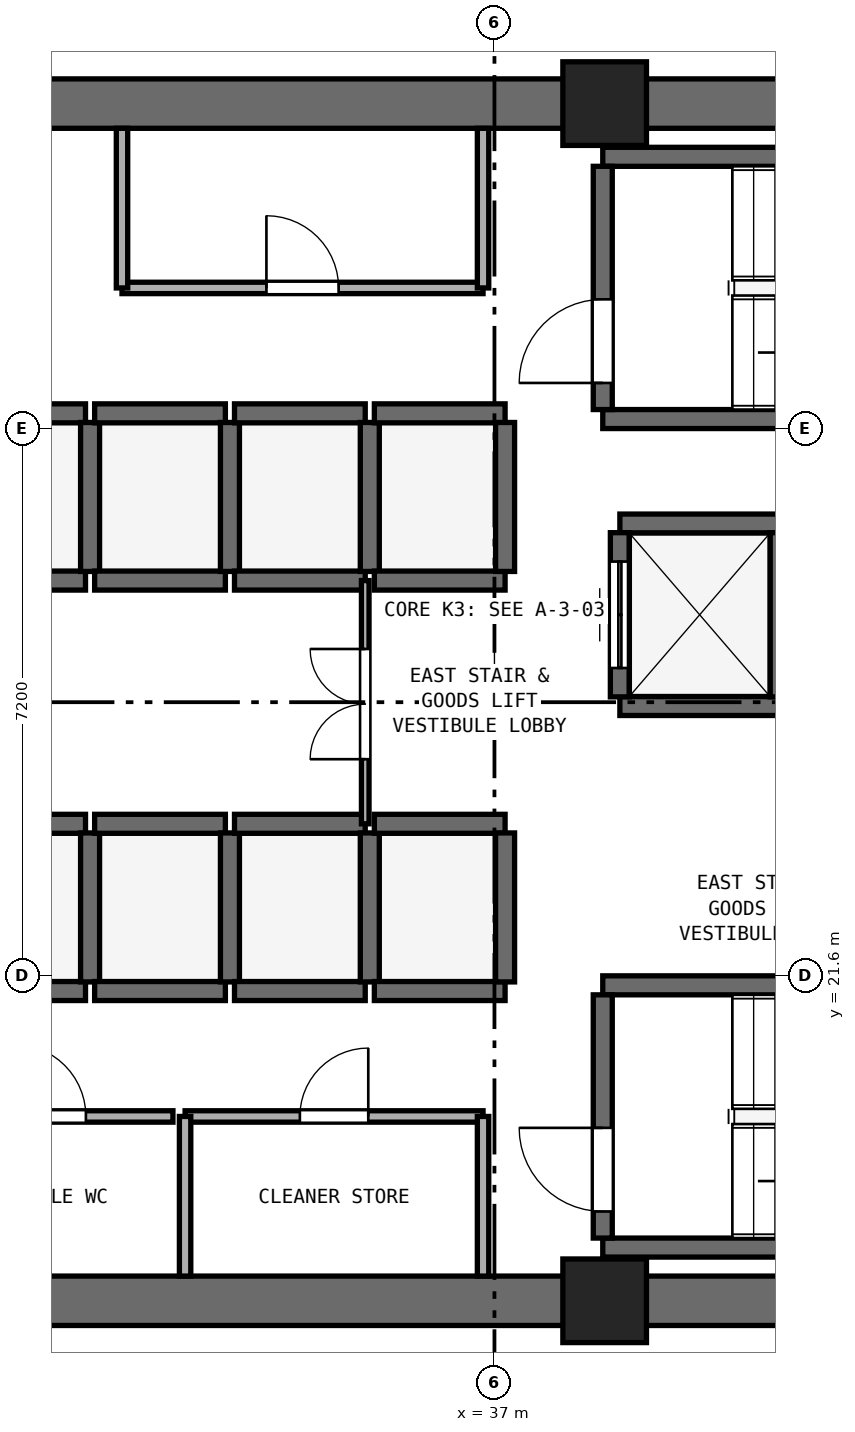
"""IFC4 building model, lengths in metres.
Left out: names, types, materials, properties, quantities, classifications, styles, units other than length and angle.
Written with IfcOpenShell. Run it as: python <this file> out.ifc"""

import sys

from ifc_helpers import new_model, si_unit, direction, frame, frame_2d, origin, origin_2d, place, context, subcontext, project, spatial, rectangle, extrude, element, fill, save


model = new_model("IFC4")
c1 = context("Model", 3, precision=1e-05, world=origin(), true_north=direction((0.0, 1.0)))
c2 = subcontext(c1, "Body", "Model", "MODEL_VIEW")
j1 = project(units=[si_unit("LENGTHUNIT", "METRE"), si_unit("PLANEANGLEUNIT", "RADIAN")], contexts=[c1])
p1 = place(None, origin())
s1 = spatial("IfcSite", under=j1, at=p1, CompositionType="ELEMENT")
p2 = place(p1, origin())
s2 = spatial("IfcBuilding", under=s1, at=p2, CompositionType="ELEMENT")
p3 = place(p2, frame((0.0, 0.0, 116.2)))
s3 = spatial("IfcBuildingStorey", under=s2, at=p3, CompositionType="ELEMENT", Elevation=116.2)
for number, where, z_axis, x_axis in (
    (1, (25.4, 17.325, 0.0), (0.0, 0.0, 1.0), (1.0, 0.0, 0.0)),
    (2, (25.4, 33.075, 0.0), (0.0, 0.0, 1.0), (1.0, 0.0, 0.0)),
):
    element("IfcWall", number, at=place(p3, frame(where, z_axis=z_axis, x_axis=x_axis)), inside=s3, PredefinedType="SHEAR", context=c2, shape_type="SweptSolid", body=[
        extrude(rectangle(XDim=23.2, YDim=0.65, at=frame_2d((11.6, 0.0))), origin(), (0.0, 0.0, 1.0), 3.4),
    ])
for number, where, z_axis, x_axis in (
    (3, (38.45, 17.325, 0.0), (0.0, 0.0, 1.0), (1.0, 0.0, 0.0)),
    (4, (38.45, 33.075, 0.0), (0.0, 0.0, 1.0), (1.0, 0.0, 0.0)),
):
    element("IfcColumn", number, at=place(p3, frame(where, z_axis=z_axis, x_axis=x_axis)), inside=s3, PredefinedType="PILASTER", context=c2, shape_type="SweptSolid", body=[
        extrude(rectangle(XDim=1.1, YDim=1.1, at=origin_2d()), origin(), (0.0, 0.0, 1.0), 3.8),
    ])
for number, where, z_axis, x_axis in (
    (5, (38.425, 28.925, 0.0), (0.0, 0.0, 1.0), (1.0, 0.0, 0.0)),
    (6, (38.425, 32.375, 0.0), (0.0, 0.0, 1.0), (1.0, 0.0, 0.0)),
):
    element("IfcWall", number, at=place(p3, frame(where, z_axis=z_axis, x_axis=x_axis)), inside=s3, PredefinedType="SHEAR", context=c2, shape_type="SweptSolid", body=[
        extrude(rectangle(XDim=7.3, YDim=0.25, at=frame_2d((3.65, 0.0))), origin(), (0.0, 0.0, 1.0), 3.4),
    ])
p4 = place(p3, frame((38.425, 29.05, 0.0), z_axis=(0.0, 0.0, 1.0), x_axis=(0.0, 1.0, 0.0)))
e7 = element("IfcWall", 7, at=p4, inside=s3, PredefinedType="SHEAR", context=c2, shape_type="SweptSolid", body=[
    extrude(rectangle(XDim=3.2, YDim=0.25, at=frame_2d((1.6, 0.0))), origin(), (0.0, 0.0, 1.0), 3.4),
])
p5 = place(p4, frame((0.35, 0.0, 0.0)))
e8 = element("IfcOpeningElement", 8, at=p5, cuts=e7, PredefinedType="OPENING", context=c2, shape_type="SweptSolid", body=[
    extrude(rectangle(XDim=1.1, YDim=2.15, at=frame_2d((0.55, 1.075))), frame((0.0, 0.135, 0.0), z_axis=(0.0, -1.0, 0.0), x_axis=(1.0, 0.0, 0.0)), (0.0, 0.0, 1.0), 0.27),
])
for number, where, z_axis, x_axis in (
    (9, (38.425, 18.025, 0.0), (0.0, 0.0, 1.0), (1.0, 0.0, 0.0)),
    (10, (38.425, 21.475, 0.0), (0.0, 0.0, 1.0), (1.0, 0.0, 0.0)),
):
    element("IfcWall", number, at=place(p3, frame(where, z_axis=z_axis, x_axis=x_axis)), inside=s3, PredefinedType="SHEAR", context=c2, shape_type="SweptSolid", body=[
        extrude(rectangle(XDim=7.3, YDim=0.25, at=frame_2d((3.65, 0.0))), origin(), (0.0, 0.0, 1.0), 3.4),
    ])
p6 = place(p3, frame((38.425, 18.15, 0.0), z_axis=(0.0, 0.0, 1.0), x_axis=(0.0, 1.0, 0.0)))
e11 = element("IfcWall", 11, at=p6, inside=s3, PredefinedType="SHEAR", context=c2, shape_type="SweptSolid", body=[
    extrude(rectangle(XDim=3.2, YDim=0.25, at=frame_2d((1.6, 0.0))), origin(), (0.0, 0.0, 1.0), 3.4),
])
p7 = place(p6, frame((0.35, 0.0, 0.0)))
e12 = element("IfcOpeningElement", 12, at=p7, cuts=e11, PredefinedType="OPENING", context=c2, shape_type="SweptSolid", body=[
    extrude(rectangle(XDim=1.1, YDim=2.15, at=frame_2d((0.55, 1.075))), frame((0.0, 0.135, 0.0), z_axis=(0.0, -1.0, 0.0), x_axis=(1.0, 0.0, 0.0)), (0.0, 0.0, 1.0), 0.27),
])
for number, where, z_axis, x_axis in (
    (13, (29.9, 21.4, 0.0), (0.0, 0.0, 1.0), (1.0, 0.0, 0.0)),
    (14, (29.9, 23.6, 0.0), (0.0, 0.0, 1.0), (1.0, 0.0, 0.0)),
):
    element("IfcWall", number, at=place(p3, frame(where, z_axis=z_axis, x_axis=x_axis)), inside=s3, PredefinedType="SHEAR", context=c2, shape_type="SweptSolid", body=[
        extrude(rectangle(XDim=1.72, YDim=0.25, at=frame_2d((0.86, 0.0))), origin(), (0.0, 0.0, 1.0), 3.4),
    ])
p8 = place(p3, frame((31.68, 21.52, 0.0), z_axis=(0.0, 0.0, 1.0), x_axis=(0.0, 1.0, 0.0)))
e15 = element("IfcWall", 15, at=p8, inside=s3, PredefinedType="SHEAR", context=c2, shape_type="SweptSolid", body=[
    extrude(rectangle(XDim=1.96, YDim=0.25, at=frame_2d((0.98, 0.0))), origin(), (0.0, 0.0, 1.0), 3.4),
])
for number, where, z_axis, x_axis in (
    (16, (31.74, 21.4, 0.0), (0.0, 0.0, 1.0), (1.0, 0.0, 0.0)),
    (17, (31.74, 23.6, 0.0), (0.0, 0.0, 1.0), (1.0, 0.0, 0.0)),
):
    element("IfcWall", number, at=place(p3, frame(where, z_axis=z_axis, x_axis=x_axis)), inside=s3, PredefinedType="SHEAR", context=c2, shape_type="SweptSolid", body=[
        extrude(rectangle(XDim=1.72, YDim=0.25, at=frame_2d((0.86, 0.0))), origin(), (0.0, 0.0, 1.0), 3.4),
    ])
p9 = place(p3, frame((33.52, 21.52, 0.0), z_axis=(0.0, 0.0, 1.0), x_axis=(0.0, 1.0, 0.0)))
e18 = element("IfcWall", 18, at=p9, inside=s3, PredefinedType="SHEAR", context=c2, shape_type="SweptSolid", body=[
    extrude(rectangle(XDim=1.96, YDim=0.25, at=frame_2d((0.98, 0.0))), origin(), (0.0, 0.0, 1.0), 3.4),
])
for number, where, z_axis, x_axis in (
    (19, (33.58, 21.4, 0.0), (0.0, 0.0, 1.0), (1.0, 0.0, 0.0)),
    (20, (33.58, 23.6, 0.0), (0.0, 0.0, 1.0), (1.0, 0.0, 0.0)),
):
    element("IfcWall", number, at=place(p3, frame(where, z_axis=z_axis, x_axis=x_axis)), inside=s3, PredefinedType="SHEAR", context=c2, shape_type="SweptSolid", body=[
        extrude(rectangle(XDim=1.72, YDim=0.25, at=frame_2d((0.86, 0.0))), origin(), (0.0, 0.0, 1.0), 3.4),
    ])
p10 = place(p3, frame((35.36, 21.52, 0.0), z_axis=(0.0, 0.0, 1.0), x_axis=(0.0, 1.0, 0.0)))
e21 = element("IfcWall", 21, at=p10, inside=s3, PredefinedType="SHEAR", context=c2, shape_type="SweptSolid", body=[
    extrude(rectangle(XDim=1.96, YDim=0.25, at=frame_2d((0.98, 0.0))), origin(), (0.0, 0.0, 1.0), 3.4),
])
for number, where, z_axis, x_axis in (
    (22, (35.42, 21.4, 0.0), (0.0, 0.0, 1.0), (1.0, 0.0, 0.0)),
    (23, (35.42, 23.6, 0.0), (0.0, 0.0, 1.0), (1.0, 0.0, 0.0)),
):
    element("IfcWall", number, at=place(p3, frame(where, z_axis=z_axis, x_axis=x_axis)), inside=s3, PredefinedType="SHEAR", context=c2, shape_type="SweptSolid", body=[
        extrude(rectangle(XDim=1.72, YDim=0.25, at=frame_2d((0.86, 0.0))), origin(), (0.0, 0.0, 1.0), 3.4),
    ])
p11 = place(p3, frame((37.14, 21.52, 0.0), z_axis=(0.0, 0.0, 1.0), x_axis=(0.0, 1.0, 0.0)))
e24 = element("IfcWall", 24, at=p11, inside=s3, PredefinedType="SHEAR", context=c2, shape_type="SweptSolid", body=[
    extrude(rectangle(XDim=1.96, YDim=0.25, at=frame_2d((0.98, 0.0))), origin(), (0.0, 0.0, 1.0), 3.4),
])
for number, where, z_axis, x_axis in (
    (25, (29.9, 26.8, 0.0), (0.0, 0.0, 1.0), (1.0, 0.0, 0.0)),
    (26, (29.9, 29.0, 0.0), (0.0, 0.0, 1.0), (1.0, 0.0, 0.0)),
):
    element("IfcWall", number, at=place(p3, frame(where, z_axis=z_axis, x_axis=x_axis)), inside=s3, PredefinedType="SHEAR", context=c2, shape_type="SweptSolid", body=[
        extrude(rectangle(XDim=1.72, YDim=0.25, at=frame_2d((0.86, 0.0))), origin(), (0.0, 0.0, 1.0), 3.4),
    ])
p12 = place(p3, frame((31.68, 26.92, 0.0), z_axis=(0.0, 0.0, 1.0), x_axis=(0.0, 1.0, 0.0)))
e27 = element("IfcWall", 27, at=p12, inside=s3, PredefinedType="SHEAR", context=c2, shape_type="SweptSolid", body=[
    extrude(rectangle(XDim=1.96, YDim=0.25, at=frame_2d((0.98, 0.0))), origin(), (0.0, 0.0, 1.0), 3.4),
])
for number, where, z_axis, x_axis in (
    (28, (31.74, 26.8, 0.0), (0.0, 0.0, 1.0), (1.0, 0.0, 0.0)),
    (29, (31.74, 29.0, 0.0), (0.0, 0.0, 1.0), (1.0, 0.0, 0.0)),
):
    element("IfcWall", number, at=place(p3, frame(where, z_axis=z_axis, x_axis=x_axis)), inside=s3, PredefinedType="SHEAR", context=c2, shape_type="SweptSolid", body=[
        extrude(rectangle(XDim=1.72, YDim=0.25, at=frame_2d((0.86, 0.0))), origin(), (0.0, 0.0, 1.0), 3.4),
    ])
p13 = place(p3, frame((33.52, 26.92, 0.0), z_axis=(0.0, 0.0, 1.0), x_axis=(0.0, 1.0, 0.0)))
e30 = element("IfcWall", 30, at=p13, inside=s3, PredefinedType="SHEAR", context=c2, shape_type="SweptSolid", body=[
    extrude(rectangle(XDim=1.96, YDim=0.25, at=frame_2d((0.98, 0.0))), origin(), (0.0, 0.0, 1.0), 3.4),
])
for number, where, z_axis, x_axis in (
    (31, (33.58, 26.8, 0.0), (0.0, 0.0, 1.0), (1.0, 0.0, 0.0)),
    (32, (33.58, 29.0, 0.0), (0.0, 0.0, 1.0), (1.0, 0.0, 0.0)),
):
    element("IfcWall", number, at=place(p3, frame(where, z_axis=z_axis, x_axis=x_axis)), inside=s3, PredefinedType="SHEAR", context=c2, shape_type="SweptSolid", body=[
        extrude(rectangle(XDim=1.72, YDim=0.25, at=frame_2d((0.86, 0.0))), origin(), (0.0, 0.0, 1.0), 3.4),
    ])
p14 = place(p3, frame((35.36, 26.92, 0.0), z_axis=(0.0, 0.0, 1.0), x_axis=(0.0, 1.0, 0.0)))
e33 = element("IfcWall", 33, at=p14, inside=s3, PredefinedType="SHEAR", context=c2, shape_type="SweptSolid", body=[
    extrude(rectangle(XDim=1.96, YDim=0.25, at=frame_2d((0.98, 0.0))), origin(), (0.0, 0.0, 1.0), 3.4),
])
for number, where, z_axis, x_axis in (
    (34, (35.42, 26.8, 0.0), (0.0, 0.0, 1.0), (1.0, 0.0, 0.0)),
    (35, (35.42, 29.0, 0.0), (0.0, 0.0, 1.0), (1.0, 0.0, 0.0)),
):
    element("IfcWall", number, at=place(p3, frame(where, z_axis=z_axis, x_axis=x_axis)), inside=s3, PredefinedType="SHEAR", context=c2, shape_type="SweptSolid", body=[
        extrude(rectangle(XDim=1.72, YDim=0.25, at=frame_2d((0.86, 0.0))), origin(), (0.0, 0.0, 1.0), 3.4),
    ])
p15 = place(p3, frame((37.14, 26.92, 0.0), z_axis=(0.0, 0.0, 1.0), x_axis=(0.0, 1.0, 0.0)))
e36 = element("IfcWall", 36, at=p15, inside=s3, PredefinedType="SHEAR", context=c2, shape_type="SweptSolid", body=[
    extrude(rectangle(XDim=1.96, YDim=0.25, at=frame_2d((0.98, 0.0))), origin(), (0.0, 0.0, 1.0), 3.4),
])
for number, where, z_axis, x_axis in (
    (37, (38.65, 25.15, 0.0), (0.0, 0.0, 1.0), (1.0, 0.0, 0.0)),
    (38, (38.65, 27.55, 0.0), (0.0, 0.0, 1.0), (1.0, 0.0, 0.0)),
):
    element("IfcWall", number, at=place(p3, frame(where, z_axis=z_axis, x_axis=x_axis)), inside=s3, PredefinedType="SHEAR", context=c2, shape_type="SweptSolid", body=[
        extrude(rectangle(XDim=2.1, YDim=0.25, at=frame_2d((1.05, 0.0))), origin(), (0.0, 0.0, 1.0), 3.4),
    ])
p16 = place(p3, frame((38.65, 25.27, 0.0), z_axis=(0.0, 0.0, 1.0), x_axis=(0.0, 1.0, 0.0)))
e39 = element("IfcWall", 39, at=p16, inside=s3, PredefinedType="SHEAR", context=c2, shape_type="SweptSolid", body=[
    extrude(rectangle(XDim=2.16, YDim=0.25, at=frame_2d((1.08, 0.0))), origin(), (0.0, 0.0, 1.0), 3.4),
])
p17 = place(p16, frame((0.38, 0.0, 0.0)))
e40 = element("IfcOpeningElement", 40, at=p17, cuts=e39, PredefinedType="OPENING", context=c2, shape_type="SweptSolid", body=[
    extrude(rectangle(XDim=1.4, YDim=2.2, at=frame_2d((0.7, 1.1))), frame((0.0, 0.135, 0.0), z_axis=(0.0, -1.0, 0.0), x_axis=(1.0, 0.0, 0.0)), (0.0, 0.0, 1.0), 0.27),
])
p18 = place(p3, frame((40.75, 25.27, 0.0), z_axis=(0.0, 0.0, 1.0), x_axis=(0.0, 1.0, 0.0)))
e41 = element("IfcWall", 41, at=p18, inside=s3, PredefinedType="SHEAR", context=c2, shape_type="SweptSolid", body=[
    extrude(rectangle(XDim=2.16, YDim=0.25, at=frame_2d((1.08, 0.0))), origin(), (0.0, 0.0, 1.0), 3.4),
])
p19 = place(p3, frame((32.1, 30.65, 0.0), z_axis=(0.0, 0.0, 1.0), x_axis=(1.0, 0.0, 0.0)))
e42 = element("IfcWall", 42, at=p19, inside=s3, PredefinedType="PARTITIONING", context=c2, shape_type="SweptSolid", body=[
    extrude(rectangle(XDim=4.75, YDim=0.15, at=frame_2d((2.375, 0.0))), origin(), (0.0, 0.0, 1.0), 3.4),
])
p20 = place(p19, frame((1.9, 0.0, 0.0)))
e43 = element("IfcOpeningElement", 43, at=p20, cuts=e42, PredefinedType="OPENING", context=c2, shape_type="SweptSolid", body=[
    extrude(rectangle(XDim=0.95, YDim=2.1, at=frame_2d((0.475, 1.05))), frame((0.0, 0.085, 0.0), z_axis=(0.0, -1.0, 0.0), x_axis=(1.0, 0.0, 0.0)), (0.0, 0.0, 1.0), 0.17),
])
for number, where, z_axis, x_axis in (
    (44, (32.1, 30.65, 0.0), (0.0, 0.0, 1.0), (0.0, 1.0, 0.0)),
    (45, (36.85, 30.65, 0.0), (0.0, 0.0, 1.0), (0.0, 1.0, 0.0)),
):
    element("IfcWall", number, at=place(p3, frame(where, z_axis=z_axis, x_axis=x_axis)), inside=s3, PredefinedType="PARTITIONING", context=c2, shape_type="SweptSolid", body=[
        extrude(rectangle(XDim=2.1, YDim=0.15, at=frame_2d((1.05, 0.0))), origin(), (0.0, 0.0, 1.0), 3.4),
    ])
p21 = place(p3, frame((29.53, 19.75, 0.0), z_axis=(0.0, 0.0, 1.0), x_axis=(1.0, 0.0, 0.0)))
e46 = element("IfcWall", 46, at=p21, inside=s3, PredefinedType="PARTITIONING", context=c2, shape_type="SweptSolid", body=[
    extrude(rectangle(XDim=3.24, YDim=0.15, at=frame_2d((1.62, 0.0))), origin(), (0.0, 0.0, 1.0), 3.4),
])
p22 = place(p21, frame((1.145, 0.0, 0.0)))
e47 = element("IfcOpeningElement", 47, at=p22, cuts=e46, PredefinedType="OPENING", context=c2, shape_type="SweptSolid", body=[
    extrude(rectangle(XDim=0.95, YDim=2.1, at=frame_2d((0.475, 1.05))), frame((0.0, 0.085, 0.0), z_axis=(0.0, -1.0, 0.0), x_axis=(1.0, 0.0, 0.0)), (0.0, 0.0, 1.0), 0.17),
])
p23 = place(p3, frame((32.93, 19.75, 0.0), z_axis=(0.0, 0.0, 1.0), x_axis=(1.0, 0.0, 0.0)))
e48 = element("IfcWall", 48, at=p23, inside=s3, PredefinedType="PARTITIONING", context=c2, shape_type="SweptSolid", body=[
    extrude(rectangle(XDim=3.92, YDim=0.15, at=frame_2d((1.96, 0.0))), origin(), (0.0, 0.0, 1.0), 3.4),
])
p24 = place(p23, frame((1.51, 0.0, 0.0)))
e49 = element("IfcOpeningElement", 49, at=p24, cuts=e48, PredefinedType="OPENING", context=c2, shape_type="SweptSolid", body=[
    extrude(rectangle(XDim=0.9, YDim=2.1, at=frame_2d((0.45, 1.05))), frame((0.0, 0.085, 0.0), z_axis=(0.0, -1.0, 0.0), x_axis=(1.0, 0.0, 0.0)), (0.0, 0.0, 1.0), 0.17),
])
for number, where, z_axis, x_axis in (
    (50, (32.93, 17.65, 0.0), (0.0, 0.0, 1.0), (0.0, 1.0, 0.0)),
    (51, (36.85, 17.65, 0.0), (0.0, 0.0, 1.0), (0.0, 1.0, 0.0)),
):
    element("IfcWall", number, at=place(p3, frame(where, z_axis=z_axis, x_axis=x_axis)), inside=s3, PredefinedType="PARTITIONING", context=c2, shape_type="SweptSolid", body=[
        extrude(rectangle(XDim=2.1, YDim=0.15, at=frame_2d((1.05, 0.0))), origin(), (0.0, 0.0, 1.0), 3.4),
    ])
p25 = place(p3, frame((35.3, 23.6, 0.0), z_axis=(0.0, 0.0, 1.0), x_axis=(0.0, 1.0, 0.0)))
e52 = element("IfcWall", 52, at=p25, inside=s3, PredefinedType="PARTITIONING", context=c2, shape_type="SweptSolid", body=[
    extrude(rectangle(XDim=3.2, YDim=0.1, at=frame_2d((1.6, 0.0))), origin(), (0.0, 0.0, 1.0), 3.4),
])
p26 = place(p25, frame((0.85, 0.0, 0.0)))
e53 = element("IfcOpeningElement", 53, at=p26, cuts=e52, PredefinedType="OPENING", context=c2, shape_type="SweptSolid", body=[
    extrude(rectangle(XDim=1.45, YDim=2.12, at=frame_2d((0.725, 1.06))), frame((0.0, 0.06, 0.0), z_axis=(0.0, -1.0, 0.0), x_axis=(1.0, 0.0, 0.0)), (0.0, 0.0, 1.0), 0.12),
])
p27 = place(p5, origin())
e54 = element("IfcDoor", 54, at=p27, inside=s3, OperationType="SINGLE_SWING_LEFT", PredefinedType="DOOR", context=c2, shape_type="SweptSolid", body=[
    extrude(rectangle(XDim=1.1, YDim=2.15, at=frame_2d((0.55, 1.075))), frame((0.0, 0.025, 0.0), z_axis=(0.0, -1.0, 0.0), x_axis=(1.0, 0.0, 0.0)), (0.0, 0.0, 1.0), 0.05),
])
fill(e8, e54)
p28 = place(p7, origin())
e55 = element("IfcDoor", 55, at=p28, inside=s3, OperationType="SINGLE_SWING_RIGHT", PredefinedType="DOOR", context=c2, shape_type="SweptSolid", body=[
    extrude(rectangle(XDim=1.1, YDim=2.15, at=frame_2d((0.55, 1.075))), frame((0.0, 0.025, 0.0), z_axis=(0.0, -1.0, 0.0), x_axis=(1.0, 0.0, 0.0)), (0.0, 0.0, 1.0), 0.05),
])
fill(e12, e55)
p29 = place(p17, origin())
e56 = element("IfcDoor", 56, at=p29, inside=s3, OperationType="DOUBLE_DOOR_SLIDING", PredefinedType="DOOR", context=c2, shape_type="SweptSolid", body=[
    extrude(rectangle(XDim=1.4, YDim=2.2, at=frame_2d((0.7, 1.1))), frame((0.0, 0.025, 0.0), z_axis=(0.0, -1.0, 0.0), x_axis=(1.0, 0.0, 0.0)), (0.0, 0.0, 1.0), 0.05),
])
fill(e40, e56)
p30 = place(p20, origin())
e57 = element("IfcDoor", 57, at=p30, inside=s3, OperationType="SINGLE_SWING_LEFT", PredefinedType="DOOR", context=c2, shape_type="SweptSolid", body=[
    extrude(rectangle(XDim=0.95, YDim=2.1, at=frame_2d((0.475, 1.05))), frame((0.0, 0.025, 0.0), z_axis=(0.0, -1.0, 0.0), x_axis=(1.0, 0.0, 0.0)), (0.0, 0.0, 1.0), 0.05),
])
fill(e43, e57)
p31 = place(p22, origin())
e58 = element("IfcDoor", 58, at=p31, inside=s3, OperationType="SINGLE_SWING_LEFT", PredefinedType="DOOR", context=c2, shape_type="SweptSolid", body=[
    extrude(rectangle(XDim=0.95, YDim=2.1, at=frame_2d((0.475, 1.05))), frame((0.0, 0.025, 0.0), z_axis=(0.0, -1.0, 0.0), x_axis=(1.0, 0.0, 0.0)), (0.0, 0.0, 1.0), 0.05),
])
fill(e47, e58)
p32 = place(p24, origin())
e59 = element("IfcDoor", 59, at=p32, inside=s3, OperationType="SINGLE_SWING_RIGHT", PredefinedType="DOOR", context=c2, shape_type="SweptSolid", body=[
    extrude(rectangle(XDim=0.9, YDim=2.1, at=frame_2d((0.45, 1.05))), frame((0.0, 0.025, 0.0), z_axis=(0.0, -1.0, 0.0), x_axis=(1.0, 0.0, 0.0)), (0.0, 0.0, 1.0), 0.05),
])
fill(e49, e59)
p33 = place(p26, origin())
e60 = element("IfcDoor", 60, at=p33, inside=s3, OperationType="DOUBLE_DOOR_SINGLE_SWING", PredefinedType="DOOR", context=c2, shape_type="SweptSolid", body=[
    extrude(rectangle(XDim=1.45, YDim=2.12, at=frame_2d((0.725, 1.06))), frame((0.0, 0.025, 0.0), z_axis=(0.0, -1.0, 0.0), x_axis=(1.0, 0.0, 0.0)), (0.0, 0.0, 1.0), 0.05),
])
fill(e53, e60)
save(model, sys.argv[1])
